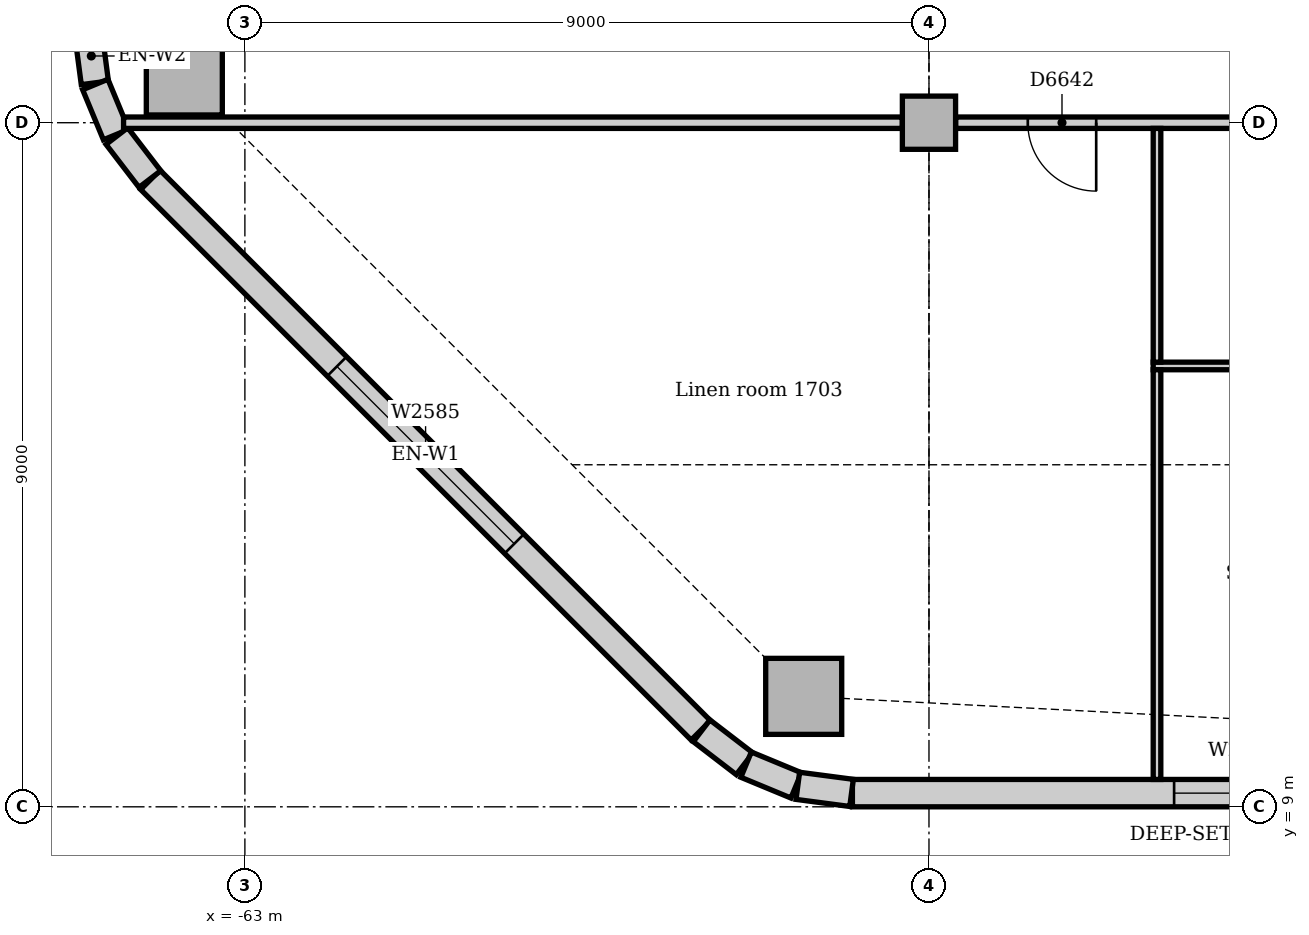
"""IFC4 building model, lengths in metres.
Left out: names, types, materials, properties, quantities, classifications, styles, units other than length and angle.
Written with IfcOpenShell. Run it as: python <this file> out.ifc"""

import sys

from ifc_helpers import new_model, si_unit, direction, frame, frame_2d, origin, origin_2d, place, context, subcontext, project, spatial, rectangle, extrude, element, fill, save


model = new_model("IFC4")
c1 = context("Model", 3, precision=1e-05, world=origin(), true_north=direction((0.0, 1.0)))
c2 = subcontext(c1, "Body", "Model", "MODEL_VIEW")
j1 = project(units=[si_unit("LENGTHUNIT", "METRE"), si_unit("PLANEANGLEUNIT", "RADIAN")], contexts=[c1])
p1 = place(None, origin())
s1 = spatial("IfcSite", under=j1, at=p1, CompositionType="ELEMENT")
p2 = place(p1, origin())
s2 = spatial("IfcBuilding", under=s1, at=p2, CompositionType="ELEMENT")
p3 = place(p2, frame((0.0, 0.0, 75.0)))
s3 = spatial("IfcBuildingStorey", under=s2, at=p3, CompositionType="ELEMENT", Elevation=75.0)
for number, where, z_axis, x_axis in (
    (1, (-55.648, 10.453, 0.0), (0.0, 0.0, 1.0), (1.0, 0.0, 0.0)),
    (2, (-63.797, 18.602, 0.0), (0.0, 0.0, 1.0), (1.0, 0.0, 0.0)),
):
    element("IfcColumn", number, at=place(p3, frame(where, z_axis=z_axis, x_axis=x_axis)), inside=s3, PredefinedType="COLUMN", context=c2, shape_type="SweptSolid", body=[
        extrude(rectangle(XDim=1.0, YDim=1.0, at=origin_2d()), origin(), (0.0, 0.0, 1.0), 3.85),
    ])
p4 = place(p3, frame((-54.0, 18.0, 0.0), z_axis=(0.0, 0.0, 1.0), x_axis=(1.0, 0.0, 0.0)))
e3 = element("IfcColumn", 3, at=p4, inside=s3, PredefinedType="COLUMN", context=c2, shape_type="SweptSolid", body=[
    extrude(rectangle(XDim=0.7, YDim=0.7, at=origin_2d()), origin(), (0.0, 0.0, 1.0), 3.85),
])
p5 = place(p3, frame((-55.007, 9.18, 0.0), z_axis=(0.0, 0.0, 1.0), x_axis=(1.0, 0.0, 0.0)))
e4 = element("IfcWall", 4, at=p5, inside=s3, PredefinedType="STANDARD", context=c2, shape_type="SweptSolid", body=[
    extrude(rectangle(XDim=23.765, YDim=0.36, at=frame_2d((11.882, 0.0))), origin(), (0.0, 0.0, 1.0), 3.85),
])
p6 = place(p5, frame((4.232, 0.0, 0.9)))
e5 = element("IfcOpeningElement", 5, at=p6, cuts=e4, PredefinedType="OPENING", context=c2, shape_type="SweptSolid", body=[
    extrude(rectangle(XDim=1.8, YDim=1.6, at=frame_2d((0.9, 0.8))), frame((0.0, 0.19, 0.0), z_axis=(0.0, -1.0, 0.0), x_axis=(1.0, 0.0, 0.0)), (0.0, 0.0, 1.0), 0.38),
])
p7 = place(p5, frame((7.982, 0.0, 0.9)))
e6 = element("IfcOpeningElement", 6, at=p7, cuts=e4, PredefinedType="OPENING", context=c2, shape_type="SweptSolid", body=[
    extrude(rectangle(XDim=3.3, YDim=1.6, at=frame_2d((1.65, 0.8))), frame((0.0, 0.19, 0.0), z_axis=(0.0, -1.0, 0.0), x_axis=(1.0, 0.0, 0.0)), (0.0, 0.0, 1.0), 0.38),
])
p8 = place(p5, frame((13.232, 0.0, 0.9)))
e7 = element("IfcOpeningElement", 7, at=p8, cuts=e4, PredefinedType="OPENING", context=c2, shape_type="SweptSolid", body=[
    extrude(rectangle(XDim=1.8, YDim=1.6, at=frame_2d((0.9, 0.8))), frame((0.0, 0.19, 0.0), z_axis=(0.0, -1.0, 0.0), x_axis=(1.0, 0.0, 0.0)), (0.0, 0.0, 1.0), 0.38),
])
p9 = place(p5, frame((16.982, 0.0, 0.9)))
e8 = element("IfcOpeningElement", 8, at=p9, cuts=e4, PredefinedType="OPENING", context=c2, shape_type="SweptSolid", body=[
    extrude(rectangle(XDim=3.3, YDim=1.6, at=frame_2d((1.65, 0.8))), frame((0.0, 0.19, 0.0), z_axis=(0.0, -1.0, 0.0), x_axis=(1.0, 0.0, 0.0)), (0.0, 0.0, 1.0), 0.38),
])
p10 = place(p3, frame((-64.244, 17.249, 0.0), z_axis=(0.0, 0.0, 1.0), x_axis=(0.707106781187, -0.707106781187, 0.0)))
e9 = element("IfcWall", 9, at=p10, inside=s3, PredefinedType="STANDARD", context=c2, shape_type="SweptSolid", body=[
    extrude(rectangle(XDim=10.243, YDim=0.36, at=frame_2d((5.121, 0.0))), origin(), (0.0, 0.0, 1.0), 3.85),
])
p11 = place(p10, frame((3.471, 0.0, 0.9)))
e10 = element("IfcOpeningElement", 10, at=p11, cuts=e9, PredefinedType="OPENING", context=c2, shape_type="SweptSolid", body=[
    extrude(rectangle(XDim=3.3, YDim=1.6, at=frame_2d((1.65, 0.8))), frame((0.0, 0.19, 0.0), z_axis=(0.0, -1.0, 0.0), x_axis=(1.0, 0.0, 0.0)), (0.0, 0.0, 1.0), 0.38),
])
for number, where, z_axis, x_axis in (
    (11, (-65.067, 19.231, 0.0), (0.0, 0.0, 1.0), (0.131, -0.991, 0.0)),
    (12, (-64.968, 18.503, 0.0), (0.0, 0.0, 1.0), (0.383, -0.924, 0.0)),
):
    element("IfcWall", number, at=place(p3, frame(where, z_axis=z_axis, x_axis=x_axis)), inside=s3, PredefinedType="STANDARD", context=c2, shape_type="SweptSolid", body=[
        extrude(rectangle(XDim=0.713, YDim=0.36, at=frame_2d((0.356, 0.0))), origin(), (0.0, 0.0, 1.0), 3.85),
    ])
for number, where, z_axis, x_axis in (
    (13, (-64.684, 17.825, 0.0), (0.0, 0.0, 1.0), (0.609, -0.793, 0.0)),
    (14, (-56.991, 10.0, 0.0), (0.0, 0.0, 1.0), (0.793, -0.609, 0.0)),
):
    element("IfcWall", number, at=place(p3, frame(where, z_axis=z_axis, x_axis=x_axis)), inside=s3, PredefinedType="STANDARD", context=c2, shape_type="SweptSolid", body=[
        extrude(rectangle(XDim=0.713, YDim=0.36, at=frame_2d((0.357, 0.0))), origin(), (0.0, 0.0, 1.0), 3.85),
    ])
for number, where, z_axis, x_axis in (
    (15, (-56.406, 9.555, 0.0), (0.0, 0.0, 1.0), (0.924, -0.383, 0.0)),
    (16, (-55.726, 9.276, 0.0), (0.0, 0.0, 1.0), (0.991, -0.131, 0.0)),
):
    element("IfcWall", number, at=place(p3, frame(where, z_axis=z_axis, x_axis=x_axis)), inside=s3, PredefinedType="STANDARD", context=c2, shape_type="SweptSolid", body=[
        extrude(rectangle(XDim=0.713, YDim=0.36, at=frame_2d((0.356, 0.0))), origin(), (0.0, 0.0, 1.0), 3.85),
    ])
p12 = place(p3, frame((-53.65, 18.0, 0.0), z_axis=(0.0, 0.0, 1.0), x_axis=(1.0, 0.0, 0.0)))
e17 = element("IfcWall", 17, at=p12, inside=s3, PredefinedType="PARTITIONING", context=c2, shape_type="SweptSolid", body=[
    extrude(rectangle(XDim=8.3, YDim=0.15, at=frame_2d((4.15, 0.0))), origin(), (0.0, 0.0, 1.0), 3.158),
])
p13 = place(p12, frame((0.95, 0.0, 0.0)))
e18 = element("IfcOpeningElement", 18, at=p13, cuts=e17, PredefinedType="OPENING", context=c2, shape_type="SweptSolid", body=[
    extrude(rectangle(XDim=0.9, YDim=2.1, at=frame_2d((0.45, 1.05))), frame((0.0, 0.085, 0.0), z_axis=(0.0, -1.0, 0.0), x_axis=(1.0, 0.0, 0.0)), (0.0, 0.0, 1.0), 0.17),
])
p14 = place(p12, frame((5.94, 0.0, 0.0)))
e19 = element("IfcOpeningElement", 19, at=p14, cuts=e17, PredefinedType="OPENING", context=c2, shape_type="SweptSolid", body=[
    extrude(rectangle(XDim=1.0, YDim=2.1, at=frame_2d((0.5, 1.05))), frame((0.0, 0.085, 0.0), z_axis=(0.0, -1.0, 0.0), x_axis=(1.0, 0.0, 0.0)), (0.0, 0.0, 1.0), 0.17),
])
p15 = place(p3, frame((-64.596, 18.0, 0.0), z_axis=(0.0, 0.0, 1.0), x_axis=(1.0, 0.0, 0.0)))
e20 = element("IfcWall", 20, at=p15, inside=s3, PredefinedType="PARTITIONING", context=c2, shape_type="SweptSolid", body=[
    extrude(rectangle(XDim=10.246, YDim=0.15, at=frame_2d((5.123, 0.0))), origin(), (0.0, 0.0, 1.0), 3.158),
])
p16 = place(p3, frame((-51.05, 14.8, 0.0), z_axis=(0.0, 0.0, 1.0), x_axis=(1.0, 0.0, 0.0)))
e21 = element("IfcWall", 21, at=p16, inside=s3, PredefinedType="PARTITIONING", context=c2, shape_type="SweptSolid", body=[
    extrude(rectangle(XDim=8.975, YDim=0.1, at=frame_2d((4.487, 0.0))), origin(), (0.0, 0.0, 1.0), 3.85),
])
p17 = place(p16, frame((3.39, 0.0, 0.0)))
e22 = element("IfcOpeningElement", 22, at=p17, cuts=e21, PredefinedType="OPENING", context=c2, shape_type="SweptSolid", body=[
    extrude(rectangle(XDim=0.9, YDim=2.1, at=frame_2d((0.45, 1.05))), frame((0.0, 0.06, 0.0), z_axis=(0.0, -1.0, 0.0), x_axis=(1.0, 0.0, 0.0)), (0.0, 0.0, 1.0), 0.12),
])
p18 = place(p3, frame((-51.0, 14.85, 0.0), z_axis=(0.0, 0.0, 1.0), x_axis=(0.0, 1.0, 0.0)))
e23 = element("IfcWall", 23, at=p18, inside=s3, PredefinedType="PARTITIONING", context=c2, shape_type="SweptSolid", body=[
    extrude(rectangle(XDim=3.075, YDim=0.1, at=frame_2d((1.538, 0.0))), origin(), (0.0, 0.0, 1.0), 3.85),
])
p19 = place(p3, frame((-51.0, 9.36, 0.0), z_axis=(0.0, 0.0, 1.0), x_axis=(0.0, 1.0, 0.0)))
e24 = element("IfcWall", 24, at=p19, inside=s3, PredefinedType="PARTITIONING", context=c2, shape_type="SweptSolid", body=[
    extrude(rectangle(XDim=5.39, YDim=0.1, at=frame_2d((2.695, 0.0))), origin(), (0.0, 0.0, 1.0), 3.85),
])
p20 = place(p6, origin())
e25 = element("IfcWindow", 25, at=p20, inside=s3, PartitioningType="SINGLE_PANEL", PredefinedType="WINDOW", context=c2, shape_type="SweptSolid", body=[
    extrude(rectangle(XDim=1.8, YDim=1.6, at=frame_2d((0.9, 0.8))), frame((0.0, 0.13, 0.0), z_axis=(0.0, -1.0, 0.0), x_axis=(1.0, 0.0, 0.0)), (0.0, 0.0, 1.0), 0.06),
])
fill(e5, e25)
p21 = place(p11, origin())
e26 = element("IfcWindow", 26, at=p21, inside=s3, PartitioningType="SINGLE_PANEL", PredefinedType="WINDOW", context=c2, shape_type="SweptSolid", body=[
    extrude(rectangle(XDim=3.3, YDim=1.6, at=frame_2d((1.65, 0.8))), frame((0.0, 0.13, 0.0), z_axis=(0.0, -1.0, 0.0), x_axis=(1.0, 0.0, 0.0)), (0.0, 0.0, 1.0), 0.06),
])
fill(e10, e26)
p22 = place(p13, frame((0.9, 0.0, 0.0), z_axis=(0.0, 0.0, 1.0), x_axis=(-1.0, 0.0, 0.0)))
e27 = element("IfcDoor", 27, at=p22, inside=s3, OperationType="SINGLE_SWING_LEFT", PredefinedType="DOOR", context=c2, shape_type="SweptSolid", body=[
    extrude(rectangle(XDim=0.9, YDim=2.1, at=frame_2d((0.45, 1.05))), frame((0.0, 0.025, 0.0), z_axis=(0.0, -1.0, 0.0), x_axis=(1.0, 0.0, 0.0)), (0.0, 0.0, 1.0), 0.05),
])
fill(e18, e27)
save(model, sys.argv[1])
